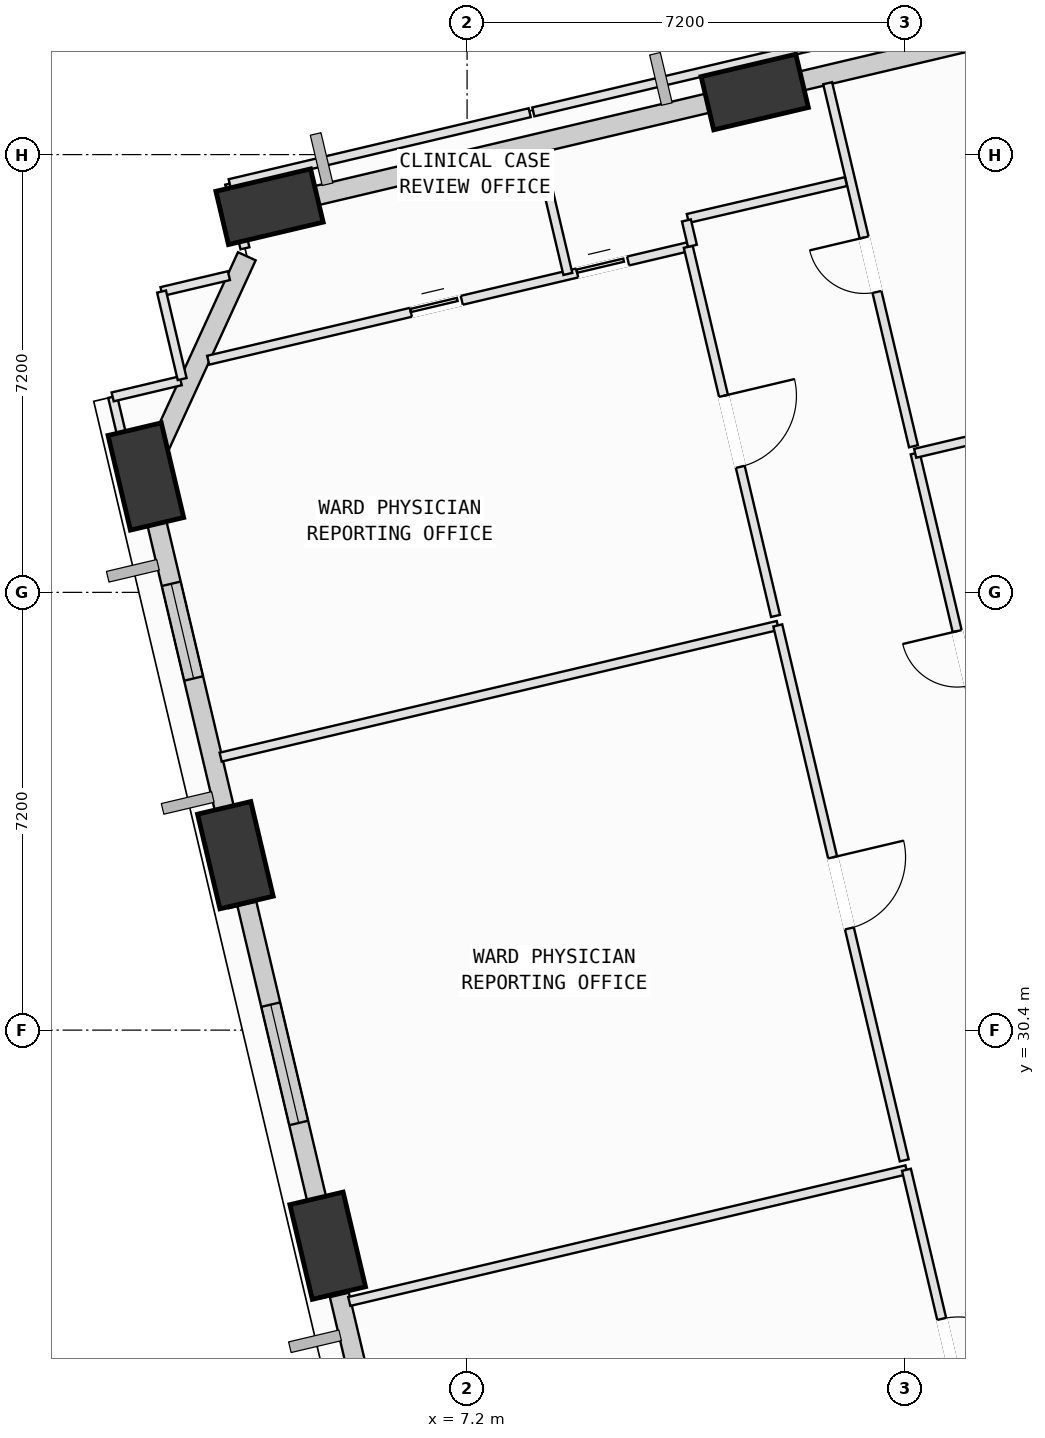
"""IFC4 building model, lengths in metres.
Left out: names, types, materials, properties, quantities, classifications, styles, units other than length and angle.
Written with IfcOpenShell. Run it as: python <this file> out.ifc"""

import sys

from ifc_helpers import new_model, si_unit, direction, frame, frame_2d, origin, origin_2d, place, context, subcontext, project, spatial, rectangle, extrude, element, fill, save


model = new_model("IFC4")
c1 = context("Model", 3, precision=1e-05, world=origin(), true_north=direction((0.0, 1.0)))
c2 = subcontext(c1, "Body", "Model", "MODEL_VIEW")
j1 = project(units=[si_unit("LENGTHUNIT", "METRE"), si_unit("PLANEANGLEUNIT", "RADIAN")], contexts=[c1])
p1 = place(None, origin())
s1 = spatial("IfcSite", under=j1, at=p1, CompositionType="ELEMENT")
p2 = place(p1, origin())
s2 = spatial("IfcBuilding", under=s1, at=p2, CompositionType="ELEMENT")
p3 = place(p2, frame((0.0, 0.0, 79.0)))
s3 = spatial("IfcBuildingStorey", under=s2, at=p3, CompositionType="ELEMENT", Elevation=79.0)
p4 = place(p3, frame((11.931, 45.829, 0.002), z_axis=(-0.085748490586, -0.08982880809, 0.992259029487), x_axis=(0.861560195965, -0.506850916025, 0.028568823104)))
e1 = element("IfcColumn", 1, at=p4, inside=s3, PredefinedType="COLUMN", context=c2, shape_type="SweptSolid", body=[
    extrude(rectangle(XDim=1.6, YDim=0.9, at=origin_2d()), origin(), (0.0, 0.0, 1.0), 3.949),
])
p5 = place(p3, frame((3.951, 43.942, 0.002), z_axis=(-0.077497819487, -0.122215236478, 0.989473356866), x_axis=(0.943770999511, -0.32891938876, 0.033291683348)))
e2 = element("IfcColumn", 2, at=p5, inside=s3, PredefinedType="COLUMN", context=c2, shape_type="SweptSolid", body=[
    extrude(rectangle(XDim=1.6, YDim=0.9, at=origin_2d()), origin(), (0.0, 0.0, 1.0), 3.947),
])
p6 = place(p3, frame((1.917, 39.506, 0.002), z_axis=(-0.059259340669, -0.130507926236, 0.989674699956), x_axis=(0.188731152124, 0.972071916583, 0.13948742312)))
e3 = element("IfcColumn", 3, at=p6, inside=s3, PredefinedType="COLUMN", context=c2, shape_type="SweptSolid", body=[
    extrude(rectangle(XDim=1.6, YDim=0.9, at=origin_2d()), origin(), (0.0, 0.0, 1.0), 3.91),
])
p7 = place(p3, frame((3.389, 33.277, 0.002), z_axis=(-0.033801168241, -0.124478102969, 0.991646450559), x_axis=(0.030884358941, 0.991609466495, 0.125526181855)))
e4 = element("IfcColumn", 4, at=p7, inside=s3, PredefinedType="COLUMN", context=c2, shape_type="SweptSolid", body=[
    extrude(rectangle(XDim=1.6, YDim=0.9, at=origin_2d()), origin(), (0.0, 0.0, 1.0), 3.915),
])
p8 = place(p3, frame((4.908, 26.854, 0.002), z_axis=(-0.007475732598, -0.118178872823, 0.992964182355), x_axis=(-0.16858477636, 0.978927541895, 0.115239059779)))
e5 = element("IfcColumn", 5, at=p8, inside=s3, PredefinedType="COLUMN", context=c2, shape_type="SweptSolid", body=[
    extrude(rectangle(XDim=1.6, YDim=0.9, at=origin_2d()), origin(), (0.0, 0.0, 1.0), 3.919),
])
p9 = place(p3, frame((12.303, 45.917, 0.0), z_axis=(0.0, 0.0, 1.0), x_axis=(0.973179362637, 0.230047664925, 0.0)))
e6 = element("IfcWall", 6, at=p9, inside=s3, PredefinedType="SOLIDWALL", context=c2, shape_type="SweptSolid", body=[
    extrude(rectangle(XDim=7.003, YDim=0.32, at=frame_2d((3.501, 0.0))), origin(), (0.0, 0.0, 1.0), 3.085),
])
p10 = place(p3, frame((4.304, 44.026, 0.0), z_axis=(0.0, 0.0, 1.0), x_axis=(0.973175854212, 0.230062506243, 0.0)))
e7 = element("IfcWall", 7, at=p10, inside=s3, PredefinedType="SOLIDWALL", context=c2, shape_type="SweptSolid", body=[
    extrude(rectangle(XDim=7.035, YDim=0.32, at=frame_2d((3.517, 0.0))), origin(), (0.0, 0.0, 1.0), 3.085),
])
p11 = place(p3, frame((2.05, 39.795, 0.0), z_axis=(0.0, 0.0, 1.0), x_axis=(0.416695986684, 0.909045903506, 0.0)))
e8 = element("IfcWall", 8, at=p11, inside=s3, PredefinedType="SOLIDWALL", context=c2, shape_type="SweptSolid", body=[
    extrude(rectangle(XDim=3.666, YDim=0.32, at=frame_2d((1.833, 0.0))), origin(), (0.0, 0.0, 1.0), 3.085),
])
p12 = place(p3, frame((3.305, 33.634, 0.0), z_axis=(0.0, 0.0, 1.0), x_axis=(-0.230065698372, 0.973175099575, 0.0)))
e9 = element("IfcWall", 9, at=p12, inside=s3, PredefinedType="SOLIDWALL", context=c2, shape_type="SweptSolid", body=[
    extrude(rectangle(XDim=5.223, YDim=0.32, at=frame_2d((2.612, 0.0))), origin(), (0.0, 0.0, 1.0), 3.085),
])
p13 = place(p12, frame((2.62, 0.0, 0.75)))
e10 = element("IfcOpeningElement", 10, at=p13, cuts=e9, PredefinedType="OPENING", context=c2, shape_type="SweptSolid", body=[
    extrude(rectangle(XDim=1.6, YDim=1.95, at=frame_2d((0.8, 0.975))), frame((0.0, 0.17, 0.0), z_axis=(0.0, -1.0, 0.0), x_axis=(1.0, 0.0, 0.0)), (0.0, 0.0, 1.0), 0.34),
])
p14 = place(p3, frame((4.821, 27.22, 0.0), z_axis=(0.0, 0.0, 1.0), x_axis=(-0.230016890779, 0.973186636754, 0.0)))
e11 = element("IfcWall", 11, at=p14, inside=s3, PredefinedType="SOLIDWALL", context=c2, shape_type="SweptSolid", body=[
    extrude(rectangle(XDim=5.4, YDim=0.32, at=frame_2d((2.7, 0.0))), origin(), (0.0, 0.0, 1.0), 3.085),
])
p15 = place(p14, frame((1.698, 0.0, 0.75)))
e12 = element("IfcOpeningElement", 12, at=p15, cuts=e11, PredefinedType="OPENING", context=c2, shape_type="SweptSolid", body=[
    extrude(rectangle(XDim=2.0, YDim=1.95, at=frame_2d((1.0, 0.975))), frame((0.0, 0.17, 0.0), z_axis=(0.0, -1.0, 0.0), x_axis=(1.0, 0.0, 0.0)), (0.0, 0.0, 1.0), 0.34),
])
p16 = place(p3, frame((6.35, 20.753, 0.0), z_axis=(0.0, 0.0, 1.0), x_axis=(-0.230050193373, 0.973178764939, 0.0)))
e13 = element("IfcWall", 13, at=p16, inside=s3, PredefinedType="SOLIDWALL", context=c2, shape_type="SweptSolid", body=[
    extrude(rectangle(XDim=5.438, YDim=0.32, at=frame_2d((2.719, 0.0))), origin(), (0.0, 0.0, 1.0), 3.085),
])
p17 = place(p16, frame((1.843, 0.0, 0.75)))
e14 = element("IfcOpeningElement", 14, at=p17, cuts=e13, PredefinedType="OPENING", context=c2, shape_type="SweptSolid", body=[
    extrude(rectangle(XDim=1.4, YDim=1.85, at=frame_2d((0.7, 0.925))), frame((0.0, 0.17, 0.0), z_axis=(0.0, -1.0, 0.0), x_axis=(1.0, 0.0, 0.0)), (0.0, 0.0, 1.0), 0.34),
])
p18 = place(p3, frame((5.263, 25.937, 0.0), z_axis=(0.0, 0.0, 1.0), x_axis=(0.973179969002, 0.230045099781, 0.0)))
e15 = element("IfcWall", 15, at=p18, inside=s3, PredefinedType="PARTITIONING", context=c2, shape_type="SweptSolid", body=[
    extrude(rectangle(XDim=9.416, YDim=0.15, at=frame_2d((4.708, 0.0))), origin(), (0.0, 0.0, 1.0), 3.7),
])
p19 = place(p3, frame((14.426, 28.103, 0.0), z_axis=(0.0, 0.0, 1.0), x_axis=(0.229968189108, -0.973198146319, 0.0)))
e16 = element("IfcWall", 16, at=p19, inside=s3, PredefinedType="PARTITIONING", context=c2, shape_type="SweptSolid", body=[
    extrude(rectangle(XDim=6.24, YDim=0.15, at=frame_2d((3.12, 0.0))), origin(), (0.0, 0.0, 1.0), 3.7),
])
p20 = place(p19, frame((2.52, 0.0, 0.0)))
e17 = element("IfcOpeningElement", 17, at=p20, cuts=e16, PredefinedType="OPENING", context=c2, shape_type="SweptSolid", body=[
    extrude(rectangle(XDim=1.2, YDim=2.15, at=frame_2d((0.6, 1.075))), frame((0.0, 0.085, 0.0), z_axis=(0.0, -1.0, 0.0), x_axis=(1.0, 0.0, 0.0)), (0.0, 0.0, 1.0), 0.17),
])
p21 = place(p3, frame((3.147, 34.89, 0.0), z_axis=(0.0, 0.0, 1.0), x_axis=(0.973179969002, 0.230045099781, 0.0)))
e18 = element("IfcWall", 18, at=p21, inside=s3, PredefinedType="PARTITIONING", context=c2, shape_type="SweptSolid", body=[
    extrude(rectangle(XDim=9.416, YDim=0.15, at=frame_2d((4.708, 0.0))), origin(), (0.0, 0.0, 1.0), 3.7),
])
p22 = place(p3, frame((12.31, 37.056, 0.0), z_axis=(0.0, 0.0, 1.0), x_axis=(0.229958952192, -0.97320032897, 0.0)))
e19 = element("IfcWall", 19, at=p22, inside=s3, PredefinedType="PARTITIONING", context=c2, shape_type="SweptSolid", body=[
    extrude(rectangle(XDim=9.04, YDim=0.15, at=frame_2d((4.52, 0.0))), origin(), (0.0, 0.0, 1.0), 2.785),
])
p23 = place(p22, frame((3.92, 0.0, 0.0)))
e20 = element("IfcOpeningElement", 20, at=p23, cuts=e19, PredefinedType="OPENING", context=c2, shape_type="SweptSolid", body=[
    extrude(rectangle(XDim=1.2, YDim=2.15, at=frame_2d((0.6, 1.075))), frame((0.0, 0.085, 0.0), z_axis=(0.0, -1.0, 0.0), x_axis=(1.0, 0.0, 0.0)), (0.0, 0.0, 1.0), 0.17),
])
p24 = place(p3, frame((4.871, 26.008, 0.0), z_axis=(0.0, 0.0, 1.0), x_axis=(-0.230216073448, 0.973139537541, 0.0)))
e21 = element("IfcWall", 21, at=p24, inside=s3, PredefinedType="PARTITIONING", context=c2, shape_type="SweptSolid", body=[
    extrude(rectangle(XDim=1.191, YDim=0.15, at=frame_2d((0.595, 0.0))), origin(), (0.0, 0.0, 1.0), 3.085),
])
p25 = place(p3, frame((3.355, 32.423, 0.0), z_axis=(0.0, 0.0, 1.0), x_axis=(-0.230205635988, 0.973142006677, 0.0)))
e22 = element("IfcWall", 22, at=p25, inside=s3, PredefinedType="PARTITIONING", context=c2, shape_type="SweptSolid", body=[
    extrude(rectangle(XDim=1.19, YDim=0.15, at=frame_2d((0.595, 0.0))), origin(), (0.0, 0.0, 1.0), 3.085),
])
p26 = place(p3, frame((2.942, 41.418, 0.0), z_axis=(0.0, 0.0, 1.0), x_axis=(0.973188164801, 0.230010425616, 0.0)))
e23 = element("IfcWall", 23, at=p26, inside=s3, PredefinedType="PARTITIONING", context=c2, shape_type="SweptSolid", body=[
    extrude(rectangle(XDim=8.113, YDim=0.15, at=frame_2d((4.056, 0.0))), origin(), (0.0, 0.0, 1.0), 3.7),
])
p27 = place(p26, frame((3.426, 0.0, 0.0)))
e24 = element("IfcOpeningElement", 24, at=p27, cuts=e23, PredefinedType="OPENING", context=c2, shape_type="SweptSolid", body=[
    extrude(rectangle(XDim=0.86, YDim=2.06, at=frame_2d((0.43, 1.03))), frame((0.0, 0.085, 0.0), z_axis=(0.0, -1.0, 0.0), x_axis=(1.0, 0.0, 0.0)), (0.0, 0.0, 1.0), 0.17),
])
p28 = place(p26, frame((6.236, 0.0, 0.0)))
e25 = element("IfcOpeningElement", 25, at=p28, cuts=e23, PredefinedType="OPENING", context=c2, shape_type="SweptSolid", body=[
    extrude(rectangle(XDim=0.86, YDim=2.06, at=frame_2d((0.43, 1.03))), frame((0.0, 0.085, 0.0), z_axis=(0.0, -1.0, 0.0), x_axis=(1.0, 0.0, 0.0)), (0.0, 0.0, 1.0), 0.17),
])
p29 = place(p3, frame((10.837, 43.284, 0.0), z_axis=(0.0, 0.0, 1.0), x_axis=(0.230151448384, -0.973154823657, 0.0)))
e26 = element("IfcWall", 26, at=p29, inside=s3, PredefinedType="PARTITIONING", context=c2, shape_type="SweptSolid", body=[
    extrude(rectangle(XDim=6.24, YDim=0.15, at=frame_2d((3.12, 0.0))), origin(), (0.0, 0.0, 1.0), 2.785),
])
p30 = place(p29, frame((2.52, 0.0, 0.0)))
e27 = element("IfcOpeningElement", 27, at=p30, cuts=e26, PredefinedType="OPENING", context=c2, shape_type="SweptSolid", body=[
    extrude(rectangle(XDim=1.2, YDim=2.15, at=frame_2d((0.6, 1.075))), frame((0.0, 0.085, 0.0), z_axis=(0.0, -1.0, 0.0), x_axis=(1.0, 0.0, 0.0)), (0.0, 0.0, 1.0), 0.17),
])
p31 = place(p3, frame((1.88, 38.664, 0.0), z_axis=(0.0, 0.0, 1.0), x_axis=(-0.230196637673, 0.973144135267, 0.0)))
e28 = element("IfcWall", 28, at=p31, inside=s3, PredefinedType="PARTITIONING", context=c2, shape_type="SweptSolid", body=[
    extrude(rectangle(XDim=2.21, YDim=0.15, at=frame_2d((1.105, 0.0))), origin(), (0.0, 0.0, 1.0), 3.085),
])
p32 = place(p3, frame((1.371, 40.815, 0.0), z_axis=(0.0, 0.0, 1.0), x_axis=(0.973053967622, 0.230577483927, 0.0)))
e29 = element("IfcWall", 29, at=p32, inside=s3, PredefinedType="PARTITIONING", context=c2, shape_type="SweptSolid", body=[
    extrude(rectangle(XDim=1.15, YDim=0.15, at=frame_2d((0.575, 0.0))), origin(), (0.0, 0.0, 1.0), 3.7),
])
p33 = place(p3, frame((16.163, 33.142, 0.0), z_axis=(0.0, 0.0, 1.0), x_axis=(-0.229991484935, 0.973192641185, 0.0)))
e30 = element("IfcWall", 30, at=p33, inside=s3, PredefinedType="PARTITIONING", context=c2, shape_type="SweptSolid", body=[
    extrude(rectangle(XDim=6.931, YDim=0.15, at=frame_2d((3.465, 0.0))), origin(), (0.0, 0.0, 1.0), 3.7),
])
p34 = place(p33, frame((3.005, 0.0, 0.0)))
e31 = element("IfcOpeningElement", 31, at=p34, cuts=e30, PredefinedType="OPENING", context=c2, shape_type="SweptSolid", body=[
    extrude(rectangle(XDim=0.92, YDim=2.1, at=frame_2d((0.46, 1.05))), frame((0.0, 0.085, 0.0), z_axis=(0.0, -1.0, 0.0), x_axis=(1.0, 0.0, 0.0)), (0.0, 0.0, 1.0), 0.17),
])
p35 = place(p3, frame((14.569, 39.887, 0.0), z_axis=(0.0, 0.0, 1.0), x_axis=(0.973198198555, 0.229967968052, 0.0)))
e32 = element("IfcWall", 32, at=p35, inside=s3, PredefinedType="PARTITIONING", context=c2, shape_type="SweptSolid", body=[
    extrude(rectangle(XDim=8.41, YDim=0.15, at=frame_2d((4.205, 0.0))), origin(), (0.0, 0.0, 1.0), 3.7),
])
p36 = place(p3, frame((14.541, 40.003, 0.0), z_axis=(0.0, 0.0, 1.0), x_axis=(-0.229988453932, 0.973193357488, 0.0)))
e33 = element("IfcWall", 33, at=p36, inside=s3, PredefinedType="PARTITIONING", context=c2, shape_type="SweptSolid", body=[
    extrude(rectangle(XDim=6.136, YDim=0.15, at=frame_2d((3.068, 0.0))), origin(), (0.0, 0.0, 1.0), 3.7),
])
p37 = place(p36, frame((2.608, 0.0, 0.0)))
e34 = element("IfcOpeningElement", 34, at=p37, cuts=e33, PredefinedType="OPENING", context=c2, shape_type="SweptSolid", body=[
    extrude(rectangle(XDim=0.92, YDim=2.1, at=frame_2d((0.46, 1.05))), frame((0.0, 0.085, 0.0), z_axis=(0.0, -1.0, 0.0), x_axis=(1.0, 0.0, 0.0)), (0.0, 0.0, 1.0), 0.17),
])
p38 = place(p3, frame((2.175, 42.547, 0.0), z_axis=(0.0, 0.0, 1.0), x_axis=(0.9731662802, 0.230103001026, 0.0)))
e35 = element("IfcWall", 35, at=p38, inside=s3, PredefinedType="PARTITIONING", context=c2, shape_type="SweptSolid", body=[
    extrude(rectangle(XDim=1.138, YDim=0.15, at=frame_2d((0.569, 0.0))), origin(), (0.0, 0.0, 1.0), 3.7),
])
p39 = place(p3, frame((3.547, 43.259, 0.0), z_axis=(0.0, 0.0, 1.0), x_axis=(-0.229998511491, 0.973190980595, 0.0)))
e36 = element("IfcWall", 36, at=p39, inside=s3, PredefinedType="PARTITIONING", context=c2, shape_type="SweptSolid", body=[
    extrude(rectangle(XDim=1.092, YDim=0.15, at=frame_2d((0.546, 0.0))), origin(), (0.0, 0.0, 1.0), 2.785),
])
p40 = place(p3, frame((3.296, 44.322, 0.0), z_axis=(0.0, 0.0, 1.0), x_axis=(0.973151285145, 0.230166409846, 0.0)))
e37 = element("IfcWall", 37, at=p40, inside=s3, PredefinedType="PARTITIONING", context=c2, shape_type="SweptSolid", body=[
    extrude(rectangle(XDim=5.07, YDim=0.15, at=frame_2d((2.535, 0.0))), origin(), (0.0, 0.0, 1.0), 3.7),
])
p41 = place(p3, frame((8.381, 44.851, 0.0), z_axis=(0.0, 0.0, 1.0), x_axis=(0.22991372917, -0.973211013675, 0.0)))
e38 = element("IfcWall", 38, at=p41, inside=s3, PredefinedType="PARTITIONING", context=c2, shape_type="SweptSolid", body=[
    extrude(rectangle(XDim=2.07, YDim=0.15, at=frame_2d((1.035, 0.0))), origin(), (0.0, 0.0, 1.0), 3.7),
])
p42 = place(p3, frame((2.514, 41.108, 0.0), z_axis=(0.0, 0.0, 1.0), x_axis=(-0.229186585679, 0.973382509061, 0.0)))
e39 = element("IfcWall", 39, at=p42, inside=s3, PredefinedType="PARTITIONING", context=c2, shape_type="SweptSolid", body=[
    extrude(rectangle(XDim=1.479, YDim=0.15, at=frame_2d((0.739, 0.0))), origin(), (0.0, 0.0, 1.0), 3.7),
])
p43 = place(p3, frame((13.431, 44.356, 0.0), z_axis=(0.0, 0.0, 1.0), x_axis=(-0.973916009073, -0.226908808272, 0.0)))
e40 = element("IfcWall", 40, at=p43, inside=s3, PredefinedType="PARTITIONING", context=c2, shape_type="SweptSolid", body=[
    extrude(rectangle(XDim=2.67, YDim=0.15, at=frame_2d((1.335, 0.0))), origin(), (0.0, 0.0, 1.0), 3.7),
])
p44 = place(p3, frame((10.807, 43.717, 0.0), z_axis=(0.0, 0.0, 1.0), x_axis=(0.23126114462, -0.972891711851, 0.0)))
e41 = element("IfcWall", 41, at=p44, inside=s3, PredefinedType="PARTITIONING", context=c2, shape_type="SweptSolid", body=[
    extrude(rectangle(XDim=0.429, YDim=0.15, at=frame_2d((0.214, 0.0))), origin(), (0.0, 0.0, 1.0), 3.7),
])
p45 = place(p3, frame((8.289, 45.502, 0.0), z_axis=(0.0, 0.0, 1.0), x_axis=(0.973152723779, 0.230160327166, 0.0)))
e42 = element("IfcWall", 42, at=p45, inside=s3, PredefinedType="PARTITIONING", context=c2, shape_type="SweptSolid", body=[
    extrude(rectangle(XDim=6.639, YDim=0.15, at=frame_2d((3.32, 0.0))), origin(), (0.0, 0.0, 1.0), 3.7),
])
p46 = place(p13, origin())
e43 = element("IfcWindow", 43, at=p46, inside=s3, PartitioningType="SINGLE_PANEL", PredefinedType="WINDOW", context=c2, shape_type="SweptSolid", body=[
    extrude(rectangle(XDim=1.6, YDim=1.95, at=frame_2d((0.8, 0.975))), frame((0.0, 0.03, 0.0), z_axis=(0.0, -1.0, 0.0), x_axis=(1.0, 0.0, 0.0)), (0.0, 0.0, 1.0), 0.06),
])
fill(e10, e43)
p47 = place(p15, origin())
e44 = element("IfcWindow", 44, at=p47, inside=s3, PartitioningType="SINGLE_PANEL", PredefinedType="WINDOW", context=c2, shape_type="SweptSolid", body=[
    extrude(rectangle(XDim=2.0, YDim=1.95, at=frame_2d((1.0, 0.975))), frame((0.0, 0.03, 0.0), z_axis=(0.0, -1.0, 0.0), x_axis=(1.0, 0.0, 0.0)), (0.0, 0.0, 1.0), 0.06),
])
fill(e12, e44)
p48 = place(p20, origin())
e45 = element("IfcDoor", 45, at=p48, inside=s3, OperationType="SINGLE_SWING_RIGHT", PredefinedType="DOOR", context=c2, shape_type="SweptSolid", body=[
    extrude(rectangle(XDim=1.2, YDim=2.15, at=frame_2d((0.6, 1.075))), frame((0.0, 0.025, 0.0), z_axis=(0.0, -1.0, 0.0), x_axis=(1.0, 0.0, 0.0)), (0.0, 0.0, 1.0), 0.05),
])
fill(e17, e45)
p49 = place(p23, origin())
e46 = element("IfcDoor", 46, at=p49, inside=s3, OperationType="SINGLE_SWING_LEFT", PredefinedType="DOOR", context=c2, shape_type="SweptSolid", body=[
    extrude(rectangle(XDim=1.2, YDim=2.15, at=frame_2d((0.6, 1.075))), frame((0.0, 0.025, 0.0), z_axis=(0.0, -1.0, 0.0), x_axis=(1.0, 0.0, 0.0)), (0.0, 0.0, 1.0), 0.05),
])
fill(e20, e46)
p50 = place(p30, origin())
e47 = element("IfcDoor", 47, at=p50, inside=s3, OperationType="SINGLE_SWING_LEFT", PredefinedType="DOOR", context=c2, shape_type="SweptSolid", body=[
    extrude(rectangle(XDim=1.2, YDim=2.15, at=frame_2d((0.6, 1.075))), frame((0.0, 0.025, 0.0), z_axis=(0.0, -1.0, 0.0), x_axis=(1.0, 0.0, 0.0)), (0.0, 0.0, 1.0), 0.05),
])
fill(e27, e47)
p51 = place(p34, origin())
e48 = element("IfcDoor", 48, at=p51, inside=s3, OperationType="SINGLE_SWING_RIGHT", PredefinedType="DOOR", context=c2, shape_type="SweptSolid", body=[
    extrude(rectangle(XDim=0.92, YDim=2.1, at=frame_2d((0.46, 1.05))), frame((0.0, 0.025, 0.0), z_axis=(0.0, -1.0, 0.0), x_axis=(1.0, 0.0, 0.0)), (0.0, 0.0, 1.0), 0.05),
])
fill(e31, e48)
p52 = place(p37, origin())
e49 = element("IfcDoor", 49, at=p52, inside=s3, OperationType="SINGLE_SWING_RIGHT", PredefinedType="DOOR", context=c2, shape_type="SweptSolid", body=[
    extrude(rectangle(XDim=0.92, YDim=2.1, at=frame_2d((0.46, 1.05))), frame((0.0, 0.025, 0.0), z_axis=(0.0, -1.0, 0.0), x_axis=(1.0, 0.0, 0.0)), (0.0, 0.0, 1.0), 0.05),
])
fill(e34, e49)
p53 = place(p27, origin())
e50 = element("IfcDoor", 50, at=p53, inside=s3, OperationType="SLIDING_TO_LEFT", PredefinedType="DOOR", context=c2, shape_type="SweptSolid", body=[
    extrude(rectangle(XDim=0.86, YDim=2.06, at=frame_2d((0.43, 1.03))), frame((0.0, 0.025, 0.0), z_axis=(0.0, -1.0, 0.0), x_axis=(1.0, 0.0, 0.0)), (0.0, 0.0, 1.0), 0.05),
])
fill(e24, e50)
p54 = place(p28, origin())
e51 = element("IfcDoor", 51, at=p54, inside=s3, OperationType="SLIDING_TO_LEFT", PredefinedType="DOOR", context=c2, shape_type="SweptSolid", body=[
    extrude(rectangle(XDim=0.86, YDim=2.06, at=frame_2d((0.43, 1.03))), frame((0.0, 0.025, 0.0), z_axis=(0.0, -1.0, 0.0), x_axis=(1.0, 0.0, 0.0)), (0.0, 0.0, 1.0), 0.05),
])
fill(e25, e51)
save(model, sys.argv[1])
